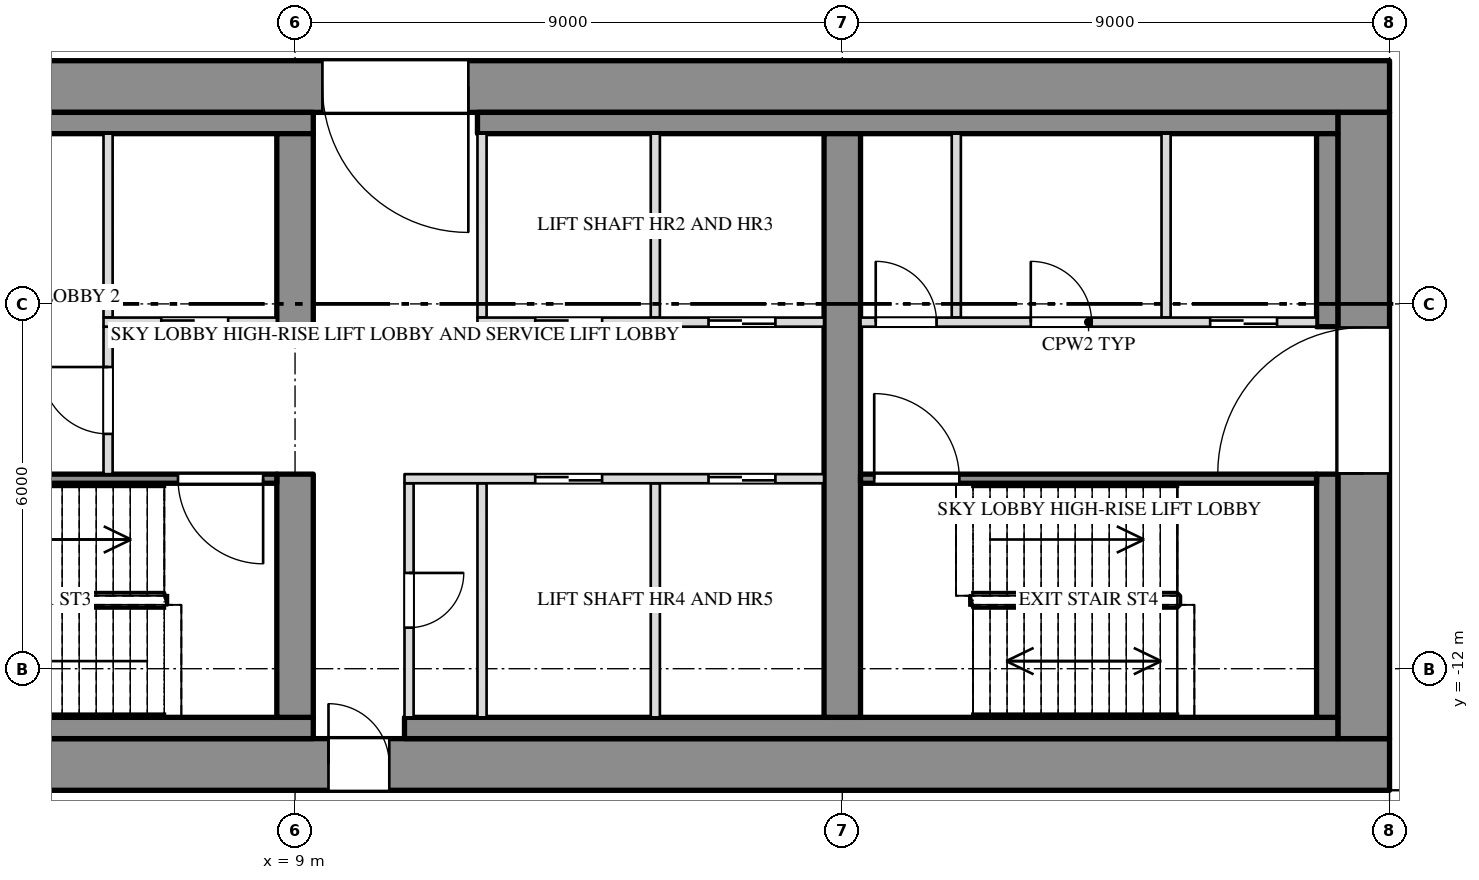
"""IFC4 building model, lengths in metres.
Left out: names, types, materials, properties, quantities, classifications, styles, units other than length and angle.
Written with IfcOpenShell. Run it as: python <this file> out.ifc"""

import sys

from ifc_helpers import new_model, si_unit, direction, frame, frame_2d, origin, place, context, subcontext, project, spatial, rectangle, extrude, element, fill, save


model = new_model("IFC4")
c1 = context("Model", 3, precision=1e-05, world=origin(), true_north=direction((0.0, 1.0)))
c2 = subcontext(c1, "Body", "Model", "MODEL_VIEW")
j1 = project(units=[si_unit("LENGTHUNIT", "METRE"), si_unit("PLANEANGLEUNIT", "RADIAN")], contexts=[c1])
p1 = place(None, origin())
s1 = spatial("IfcSite", under=j1, at=p1, CompositionType="ELEMENT")
p2 = place(p1, origin())
s2 = spatial("IfcBuilding", under=s1, at=p2, CompositionType="ELEMENT")
p3 = place(p2, frame((0.0, 0.0, 212.5)))
s3 = spatial("IfcBuildingStorey", under=s2, at=p3, CompositionType="ELEMENT", Elevation=212.5)
p4 = place(p3, frame((-27.0, -2.425, 0.0), z_axis=(0.0, 0.0, 1.0), x_axis=(1.0, 0.0, 0.0)))
e1 = element("IfcWall", 1, at=p4, inside=s3, PredefinedType="SHEAR", context=c2, shape_type="SweptSolid", body=[
    extrude(rectangle(XDim=54.0, YDim=0.85, at=frame_2d((27.0, 0.0))), origin(), (0.0, 0.0, 1.0), 3.65),
])
p5 = place(p4, frame((15.15, 0.0, 0.0)))
e2 = element("IfcOpeningElement", 2, at=p5, cuts=e1, PredefinedType="OPENING", context=c2, shape_type="SweptSolid", body=[
    extrude(rectangle(XDim=2.4, YDim=2.1, at=frame_2d((1.2, 1.05))), frame((0.0, 0.437, 0.0), z_axis=(0.0, -1.0, 0.0), x_axis=(1.0, 0.0, 0.0)), (0.0, 0.0, 1.0), 0.874),
])
p6 = place(p4, frame((36.45, 0.0, 0.0)))
e3 = element("IfcOpeningElement", 3, at=p6, cuts=e1, PredefinedType="OPENING", context=c2, shape_type="SweptSolid", body=[
    extrude(rectangle(XDim=2.4, YDim=2.1, at=frame_2d((1.2, 1.05))), frame((0.0, 0.437, 0.0), z_axis=(0.0, -1.0, 0.0), x_axis=(1.0, 0.0, 0.0)), (0.0, 0.0, 1.0), 0.874),
])
p7 = place(p3, frame((-27.0, -13.575, 0.0), z_axis=(0.0, 0.0, 1.0), x_axis=(1.0, 0.0, 0.0)))
e4 = element("IfcWall", 4, at=p7, inside=s3, PredefinedType="SHEAR", context=c2, shape_type="SweptSolid", body=[
    extrude(rectangle(XDim=54.0, YDim=0.85, at=frame_2d((27.0, 0.0))), origin(), (0.0, 0.0, 1.0), 3.65),
])
p8 = place(p7, frame((16.45, 0.0, 0.0)))
e5 = element("IfcOpeningElement", 5, at=p8, cuts=e4, PredefinedType="OPENING", context=c2, shape_type="SweptSolid", body=[
    extrude(rectangle(XDim=1.0, YDim=2.1, at=frame_2d((0.5, 1.05))), frame((0.0, 0.437, 0.0), z_axis=(0.0, -1.0, 0.0), x_axis=(1.0, 0.0, 0.0)), (0.0, 0.0, 1.0), 0.874),
])
p9 = place(p7, frame((36.55, 0.0, 0.0)))
e6 = element("IfcOpeningElement", 6, at=p9, cuts=e4, PredefinedType="OPENING", context=c2, shape_type="SweptSolid", body=[
    extrude(rectangle(XDim=1.0, YDim=2.1, at=frame_2d((0.5, 1.05))), frame((0.0, 0.437, 0.0), z_axis=(0.0, -1.0, 0.0), x_axis=(1.0, 0.0, 0.0)), (0.0, 0.0, 1.0), 0.874),
])
p10 = place(p3, frame((26.575, -13.15, 0.0), z_axis=(0.0, 0.0, 1.0), x_axis=(0.0, 1.0, 0.0)))
e7 = element("IfcWall", 7, at=p10, inside=s3, PredefinedType="SHEAR", context=c2, shape_type="SweptSolid", body=[
    extrude(rectangle(XDim=10.3, YDim=0.85, at=frame_2d((5.15, 0.0))), origin(), (0.0, 0.0, 1.0), 3.65),
])
p11 = place(p10, frame((4.362, 0.0, 0.0)))
e8 = element("IfcOpeningElement", 8, at=p11, cuts=e7, PredefinedType="OPENING", context=c2, shape_type="SweptSolid", body=[
    extrude(rectangle(XDim=2.4, YDim=2.1, at=frame_2d((1.2, 1.05))), frame((0.0, 0.437, 0.0), z_axis=(0.0, -1.0, 0.0), x_axis=(1.0, 0.0, 0.0)), (0.0, 0.0, 1.0), 0.874),
])
p12 = place(p3, frame((-9.3, -3.025, 0.0), z_axis=(0.0, 0.0, 1.0), x_axis=(1.0, 0.0, 0.0)))
e9 = element("IfcWall", 9, at=p12, inside=s3, PredefinedType="SHEAR", context=c2, shape_type="SweptSolid", body=[
    extrude(rectangle(XDim=18.6, YDim=0.35, at=frame_2d((9.3, 0.0))), origin(), (0.0, 0.0, 1.0), 3.65),
])
p13 = place(p3, frame((12.0, -3.025, 0.0), z_axis=(0.0, 0.0, 1.0), x_axis=(1.0, 0.0, 0.0)))
e10 = element("IfcWall", 10, at=p13, inside=s3, PredefinedType="SHEAR", context=c2, shape_type="SweptSolid", body=[
    extrude(rectangle(XDim=14.15, YDim=0.35, at=frame_2d((7.075, 0.0))), origin(), (0.0, 0.0, 1.0), 3.65),
])
p14 = place(p3, frame((-9.3, -12.975, 0.0), z_axis=(0.0, 0.0, 1.0), x_axis=(1.0, 0.0, 0.0)))
e11 = element("IfcWall", 11, at=p14, inside=s3, PredefinedType="SHEAR", context=c2, shape_type="SweptSolid", body=[
    extrude(rectangle(XDim=18.6, YDim=0.35, at=frame_2d((9.3, 0.0))), origin(), (0.0, 0.0, 1.0), 3.65),
])
p15 = place(p3, frame((10.8, -12.975, 0.0), z_axis=(0.0, 0.0, 1.0), x_axis=(1.0, 0.0, 0.0)))
e12 = element("IfcWall", 12, at=p15, inside=s3, PredefinedType="SHEAR", context=c2, shape_type="SweptSolid", body=[
    extrude(rectangle(XDim=15.35, YDim=0.35, at=frame_2d((7.675, 0.0))), origin(), (0.0, 0.0, 1.0), 3.65),
])
p16 = place(p3, frame((25.975, -12.8, 0.0), z_axis=(0.0, 0.0, 1.0), x_axis=(0.0, 1.0, 0.0)))
e13 = element("IfcWall", 13, at=p16, inside=s3, PredefinedType="SHEAR", context=c2, shape_type="SweptSolid", body=[
    extrude(rectangle(XDim=4.0, YDim=0.35, at=frame_2d((2.0, 0.0))), origin(), (0.0, 0.0, 1.0), 3.65),
])
p17 = place(p3, frame((25.975, -6.375, 0.0), z_axis=(0.0, 0.0, 1.0), x_axis=(0.0, 1.0, 0.0)))
e14 = element("IfcWall", 14, at=p17, inside=s3, PredefinedType="SHEAR", context=c2, shape_type="SweptSolid", body=[
    extrude(rectangle(XDim=3.175, YDim=0.35, at=frame_2d((1.587, 0.0))), origin(), (0.0, 0.0, 1.0), 3.65),
])
p18 = place(p3, frame((9.0, -12.8, 0.0), z_axis=(0.0, 0.0, 1.0), x_axis=(0.0, 1.0, 0.0)))
e15 = element("IfcWall", 15, at=p18, inside=s3, PredefinedType="SHEAR", context=c2, shape_type="SweptSolid", body=[
    extrude(rectangle(XDim=4.0, YDim=0.6, at=frame_2d((2.0, 0.0))), origin(), (0.0, 0.0, 1.0), 3.65),
])
p19 = place(p3, frame((9.0, -6.375, 0.0), z_axis=(0.0, 0.0, 1.0), x_axis=(0.0, 1.0, 0.0)))
e16 = element("IfcWall", 16, at=p19, inside=s3, PredefinedType="SHEAR", context=c2, shape_type="SweptSolid", body=[
    extrude(rectangle(XDim=3.175, YDim=0.6, at=frame_2d((1.587, 0.0))), origin(), (0.0, 0.0, 1.0), 3.65),
])
p20 = place(p3, frame((18.0, -12.8, 0.0), z_axis=(0.0, 0.0, 1.0), x_axis=(0.0, 1.0, 0.0)))
e17 = element("IfcWall", 17, at=p20, inside=s3, PredefinedType="SHEAR", context=c2, shape_type="SweptSolid", body=[
    extrude(rectangle(XDim=9.6, YDim=0.6, at=frame_2d((4.8, 0.0))), origin(), (0.0, 0.0, 1.0), 3.65),
])
for number, where, z_axis, x_axis in (
    (18, (5.925, -6.225, 0.0), (0.0, 0.0, 1.0), (0.0, 1.0, 0.0)),
    (19, (12.075, -6.225, 0.0), (0.0, 0.0, 1.0), (0.0, 1.0, 0.0)),
    (20, (14.925, -6.225, 0.0), (0.0, 0.0, 1.0), (0.0, 1.0, 0.0)),
    (21, (19.875, -6.225, 0.0), (0.0, 0.0, 1.0), (0.0, 1.0, 0.0)),
    (22, (23.325, -6.225, 0.0), (0.0, 0.0, 1.0), (0.0, 1.0, 0.0)),
):
    element("IfcWall", number, at=place(p3, frame(where, z_axis=z_axis, x_axis=x_axis)), inside=s3, PredefinedType="PARTITIONING", context=c2, shape_type="SweptSolid", body=[
        extrude(rectangle(XDim=3.025, YDim=0.15, at=frame_2d((1.513, 0.0))), origin(), (0.0, 0.0, 1.0), 3.65),
    ])
p21 = place(p3, frame((10.875, -12.8, 0.0), z_axis=(0.0, 0.0, 1.0), x_axis=(0.0, 1.0, 0.0)))
e23 = element("IfcWall", 23, at=p21, inside=s3, PredefinedType="PARTITIONING", context=c2, shape_type="SweptSolid", body=[
    extrude(rectangle(XDim=3.85, YDim=0.15, at=frame_2d((1.925, 0.0))), origin(), (0.0, 0.0, 1.0), 3.65),
])
p22 = place(p21, frame((1.475, 0.0, 0.0)))
e24 = element("IfcOpeningElement", 24, at=p22, cuts=e23, PredefinedType="OPENING", context=c2, shape_type="SweptSolid", body=[
    extrude(rectangle(XDim=0.9, YDim=2.1, at=frame_2d((0.45, 1.05))), frame((0.0, 0.087, 0.0), z_axis=(0.0, -1.0, 0.0), x_axis=(1.0, 0.0, 0.0)), (0.0, 0.0, 1.0), 0.174),
])
for number, where, z_axis, x_axis in (
    (25, (12.075, -12.8, 0.0), (0.0, 0.0, 1.0), (0.0, 1.0, 0.0)),
    (26, (14.925, -12.8, 0.0), (0.0, 0.0, 1.0), (0.0, 1.0, 0.0)),
):
    element("IfcWall", number, at=place(p3, frame(where, z_axis=z_axis, x_axis=x_axis)), inside=s3, PredefinedType="PARTITIONING", context=c2, shape_type="SweptSolid", body=[
        extrude(rectangle(XDim=3.85, YDim=0.15, at=frame_2d((1.925, 0.0))), origin(), (0.0, 0.0, 1.0), 3.65),
    ])
p23 = place(p3, frame((5.925, -8.8, 0.0), z_axis=(0.0, 0.0, 1.0), x_axis=(0.0, 1.0, 0.0)))
e27 = element("IfcWall", 27, at=p23, inside=s3, PredefinedType="PARTITIONING", context=c2, shape_type="SweptSolid", body=[
    extrude(rectangle(XDim=2.425, YDim=0.15, at=frame_2d((1.212, 0.0))), origin(), (0.0, 0.0, 1.0), 3.65),
])
p24 = place(p23, frame((0.662, 0.0, 0.0)))
e28 = element("IfcOpeningElement", 28, at=p24, cuts=e27, PredefinedType="OPENING", context=c2, shape_type="SweptSolid", body=[
    extrude(rectangle(XDim=1.1, YDim=2.1, at=frame_2d((0.55, 1.05))), frame((0.0, 0.087, 0.0), z_axis=(0.0, -1.0, 0.0), x_axis=(1.0, 0.0, 0.0)), (0.0, 0.0, 1.0), 0.174),
])
p25 = place(p3, frame((5.85, -6.3, 0.0), z_axis=(0.0, 0.0, 1.0), x_axis=(1.0, 0.0, 0.0)))
e29 = element("IfcWall", 29, at=p25, inside=s3, PredefinedType="PARTITIONING", context=c2, shape_type="SweptSolid", body=[
    extrude(rectangle(XDim=2.85, YDim=0.15, at=frame_2d((1.425, 0.0))), origin(), (0.0, 0.0, 1.0), 3.65),
])
p26 = place(p25, frame((0.95, 0.0, 0.0)))
e30 = element("IfcOpeningElement", 30, at=p26, cuts=e29, PredefinedType="OPENING", context=c2, shape_type="SweptSolid", body=[
    extrude(rectangle(XDim=1.1, YDim=2.1, at=frame_2d((0.55, 1.05))), frame((0.0, 0.087, 0.0), z_axis=(0.0, -1.0, 0.0), x_axis=(1.0, 0.0, 0.0)), (0.0, 0.0, 1.0), 0.174),
])
p27 = place(p3, frame((12.0, -6.3, 0.0), z_axis=(0.0, 0.0, 1.0), x_axis=(1.0, 0.0, 0.0)))
e31 = element("IfcWall", 31, at=p27, inside=s3, PredefinedType="PARTITIONING", context=c2, shape_type="SweptSolid", body=[
    extrude(rectangle(XDim=5.7, YDim=0.15, at=frame_2d((2.85, 0.0))), origin(), (0.0, 0.0, 1.0), 3.65),
])
p28 = place(p27, frame((0.95, 0.0, 0.0)))
e32 = element("IfcOpeningElement", 32, at=p28, cuts=e31, PredefinedType="OPENING", context=c2, shape_type="SweptSolid", body=[
    extrude(rectangle(XDim=1.1, YDim=2.1, at=frame_2d((0.55, 1.05))), frame((0.0, 0.087, 0.0), z_axis=(0.0, -1.0, 0.0), x_axis=(1.0, 0.0, 0.0)), (0.0, 0.0, 1.0), 0.174),
])
p29 = place(p27, frame((3.8, 0.0, 0.0)))
e33 = element("IfcOpeningElement", 33, at=p29, cuts=e31, PredefinedType="OPENING", context=c2, shape_type="SweptSolid", body=[
    extrude(rectangle(XDim=1.1, YDim=2.1, at=frame_2d((0.55, 1.05))), frame((0.0, 0.087, 0.0), z_axis=(0.0, -1.0, 0.0), x_axis=(1.0, 0.0, 0.0)), (0.0, 0.0, 1.0), 0.174),
])
p30 = place(p3, frame((18.3, -6.3, 0.0), z_axis=(0.0, 0.0, 1.0), x_axis=(1.0, 0.0, 0.0)))
e34 = element("IfcWall", 34, at=p30, inside=s3, PredefinedType="PARTITIONING", context=c2, shape_type="SweptSolid", body=[
    extrude(rectangle(XDim=7.5, YDim=0.15, at=frame_2d((3.75, 0.0))), origin(), (0.0, 0.0, 1.0), 3.65),
])
p31 = place(p30, frame((0.25, 0.0, 0.0)))
e35 = element("IfcOpeningElement", 35, at=p31, cuts=e34, PredefinedType="OPENING", context=c2, shape_type="SweptSolid", body=[
    extrude(rectangle(XDim=1.0, YDim=2.1, at=frame_2d((0.5, 1.05))), frame((0.0, 0.087, 0.0), z_axis=(0.0, -1.0, 0.0), x_axis=(1.0, 0.0, 0.0)), (0.0, 0.0, 1.0), 0.174),
])
p32 = place(p30, frame((2.8, 0.0, 0.0)))
e36 = element("IfcOpeningElement", 36, at=p32, cuts=e34, PredefinedType="OPENING", context=c2, shape_type="SweptSolid", body=[
    extrude(rectangle(XDim=1.0, YDim=2.1, at=frame_2d((0.5, 1.05))), frame((0.0, 0.087, 0.0), z_axis=(0.0, -1.0, 0.0), x_axis=(1.0, 0.0, 0.0)), (0.0, 0.0, 1.0), 0.174),
])
p33 = place(p30, frame((5.75, 0.0, 0.0)))
e37 = element("IfcOpeningElement", 37, at=p33, cuts=e34, PredefinedType="OPENING", context=c2, shape_type="SweptSolid", body=[
    extrude(rectangle(XDim=1.1, YDim=2.1, at=frame_2d((0.55, 1.05))), frame((0.0, 0.087, 0.0), z_axis=(0.0, -1.0, 0.0), x_axis=(1.0, 0.0, 0.0)), (0.0, 0.0, 1.0), 0.174),
])
p34 = place(p3, frame((0.3, -8.875, 0.0), z_axis=(0.0, 0.0, 1.0), x_axis=(1.0, 0.0, 0.0)))
e38 = element("IfcWall", 38, at=p34, inside=s3, PredefinedType="SHEAR", context=c2, shape_type="SweptSolid", body=[
    extrude(rectangle(XDim=8.4, YDim=0.15, at=frame_2d((4.2, 0.0))), origin(), (0.0, 0.0, 1.0), 3.65),
])
p35 = place(p34, frame((6.775, 0.0, 0.0)))
e39 = element("IfcOpeningElement", 39, at=p35, cuts=e38, PredefinedType="OPENING", context=c2, shape_type="SweptSolid", body=[
    extrude(rectangle(XDim=1.4, YDim=2.1, at=frame_2d((0.7, 1.05))), frame((0.0, 0.087, 0.0), z_axis=(0.0, -1.0, 0.0), x_axis=(1.0, 0.0, 0.0)), (0.0, 0.0, 1.0), 0.174),
])
p36 = place(p3, frame((10.8, -8.875, 0.0), z_axis=(0.0, 0.0, 1.0), x_axis=(1.0, 0.0, 0.0)))
e40 = element("IfcWall", 40, at=p36, inside=s3, PredefinedType="PARTITIONING", context=c2, shape_type="SweptSolid", body=[
    extrude(rectangle(XDim=6.9, YDim=0.15, at=frame_2d((3.45, 0.0))), origin(), (0.0, 0.0, 1.0), 3.65),
])
p37 = place(p36, frame((2.15, 0.0, 0.0)))
e41 = element("IfcOpeningElement", 41, at=p37, cuts=e40, PredefinedType="OPENING", context=c2, shape_type="SweptSolid", body=[
    extrude(rectangle(XDim=1.1, YDim=2.1, at=frame_2d((0.55, 1.05))), frame((0.0, 0.087, 0.0), z_axis=(0.0, -1.0, 0.0), x_axis=(1.0, 0.0, 0.0)), (0.0, 0.0, 1.0), 0.174),
])
p38 = place(p36, frame((5.0, 0.0, 0.0)))
e42 = element("IfcOpeningElement", 42, at=p38, cuts=e40, PredefinedType="OPENING", context=c2, shape_type="SweptSolid", body=[
    extrude(rectangle(XDim=1.1, YDim=2.1, at=frame_2d((0.55, 1.05))), frame((0.0, 0.087, 0.0), z_axis=(0.0, -1.0, 0.0), x_axis=(1.0, 0.0, 0.0)), (0.0, 0.0, 1.0), 0.174),
])
p39 = place(p3, frame((18.3, -8.875, 0.0), z_axis=(0.0, 0.0, 1.0), x_axis=(1.0, 0.0, 0.0)))
e43 = element("IfcWall", 43, at=p39, inside=s3, PredefinedType="SHEAR", context=c2, shape_type="SweptSolid", body=[
    extrude(rectangle(XDim=7.5, YDim=0.15, at=frame_2d((3.75, 0.0))), origin(), (0.0, 0.0, 1.0), 3.65),
])
p40 = place(p39, frame((0.225, 0.0, 0.0)))
e44 = element("IfcOpeningElement", 44, at=p40, cuts=e43, PredefinedType="OPENING", context=c2, shape_type="SweptSolid", body=[
    extrude(rectangle(XDim=1.4, YDim=2.1, at=frame_2d((0.7, 1.05))), frame((0.0, 0.087, 0.0), z_axis=(0.0, -1.0, 0.0), x_axis=(1.0, 0.0, 0.0)), (0.0, 0.0, 1.0), 0.174),
])
p41 = place(p24, origin())
e45 = element("IfcDoor", 45, at=p41, inside=s3, OperationType="SINGLE_SWING_RIGHT", PredefinedType="DOOR", context=c2, shape_type="SweptSolid", body=[
    extrude(rectangle(XDim=1.1, YDim=2.1, at=frame_2d((0.55, 1.05))), frame((0.0, 0.025, 0.0), z_axis=(0.0, -1.0, 0.0), x_axis=(1.0, 0.0, 0.0)), (0.0, 0.0, 1.0), 0.05),
])
fill(e28, e45)
p42 = place(p26, origin())
e46 = element("IfcDoor", 46, at=p42, inside=s3, OperationType="SLIDING_TO_LEFT", PredefinedType="DOOR", context=c2, shape_type="SweptSolid", body=[
    extrude(rectangle(XDim=1.1, YDim=2.1, at=frame_2d((0.55, 1.05))), frame((0.0, 0.025, 0.0), z_axis=(0.0, -1.0, 0.0), x_axis=(1.0, 0.0, 0.0)), (0.0, 0.0, 1.0), 0.05),
])
fill(e30, e46)
p43 = place(p35, origin())
e47 = element("IfcDoor", 47, at=p43, inside=s3, OperationType="DOUBLE_DOOR_SINGLE_SWING", PredefinedType="DOOR", context=c2, shape_type="SweptSolid", body=[
    extrude(rectangle(XDim=1.4, YDim=2.1, at=frame_2d((0.7, 1.05))), frame((0.0, 0.025, 0.0), z_axis=(0.0, -1.0, 0.0), x_axis=(1.0, 0.0, 0.0)), (0.0, 0.0, 1.0), 0.05),
])
fill(e39, e47)
p44 = place(p9, origin())
e48 = element("IfcDoor", 48, at=p44, inside=s3, OperationType="SINGLE_SWING_LEFT", PredefinedType="DOOR", context=c2, shape_type="SweptSolid", body=[
    extrude(rectangle(XDim=1.0, YDim=2.1, at=frame_2d((0.5, 1.05))), frame((0.0, 0.025, 0.0), z_axis=(0.0, -1.0, 0.0), x_axis=(1.0, 0.0, 0.0)), (0.0, 0.0, 1.0), 0.05),
])
fill(e6, e48)
p45 = place(p6, origin())
e49 = element("IfcDoor", 49, at=p45, inside=s3, OperationType="DOUBLE_DOOR_SINGLE_SWING", PredefinedType="DOOR", context=c2, shape_type="SweptSolid", body=[
    extrude(rectangle(XDim=2.4, YDim=2.1, at=frame_2d((1.2, 1.05))), frame((0.0, 0.025, 0.0), z_axis=(0.0, -1.0, 0.0), x_axis=(1.0, 0.0, 0.0)), (0.0, 0.0, 1.0), 0.05),
])
fill(e3, e49)
p46 = place(p22, origin())
e50 = element("IfcDoor", 50, at=p46, inside=s3, OperationType="SINGLE_SWING_LEFT", PredefinedType="DOOR", context=c2, shape_type="SweptSolid", body=[
    extrude(rectangle(XDim=0.9, YDim=2.1, at=frame_2d((0.45, 1.05))), frame((0.0, 0.025, 0.0), z_axis=(0.0, -1.0, 0.0), x_axis=(1.0, 0.0, 0.0)), (0.0, 0.0, 1.0), 0.05),
])
fill(e24, e50)
p47 = place(p37, origin())
e51 = element("IfcDoor", 51, at=p47, inside=s3, OperationType="SLIDING_TO_RIGHT", PredefinedType="DOOR", context=c2, shape_type="SweptSolid", body=[
    extrude(rectangle(XDim=1.1, YDim=2.1, at=frame_2d((0.55, 1.05))), frame((0.0, 0.025, 0.0), z_axis=(0.0, -1.0, 0.0), x_axis=(1.0, 0.0, 0.0)), (0.0, 0.0, 1.0), 0.05),
])
fill(e41, e51)
p48 = place(p28, origin())
e52 = element("IfcDoor", 52, at=p48, inside=s3, OperationType="SLIDING_TO_LEFT", PredefinedType="DOOR", context=c2, shape_type="SweptSolid", body=[
    extrude(rectangle(XDim=1.1, YDim=2.1, at=frame_2d((0.55, 1.05))), frame((0.0, 0.025, 0.0), z_axis=(0.0, -1.0, 0.0), x_axis=(1.0, 0.0, 0.0)), (0.0, 0.0, 1.0), 0.05),
])
fill(e32, e52)
p49 = place(p38, origin())
e53 = element("IfcDoor", 53, at=p49, inside=s3, OperationType="SLIDING_TO_RIGHT", PredefinedType="DOOR", context=c2, shape_type="SweptSolid", body=[
    extrude(rectangle(XDim=1.1, YDim=2.1, at=frame_2d((0.55, 1.05))), frame((0.0, 0.025, 0.0), z_axis=(0.0, -1.0, 0.0), x_axis=(1.0, 0.0, 0.0)), (0.0, 0.0, 1.0), 0.05),
])
fill(e42, e53)
p50 = place(p29, origin())
e54 = element("IfcDoor", 54, at=p50, inside=s3, OperationType="SLIDING_TO_LEFT", PredefinedType="DOOR", context=c2, shape_type="SweptSolid", body=[
    extrude(rectangle(XDim=1.1, YDim=2.1, at=frame_2d((0.55, 1.05))), frame((0.0, 0.025, 0.0), z_axis=(0.0, -1.0, 0.0), x_axis=(1.0, 0.0, 0.0)), (0.0, 0.0, 1.0), 0.05),
])
fill(e33, e54)
p51 = place(p31, origin())
e55 = element("IfcDoor", 55, at=p51, inside=s3, OperationType="SINGLE_SWING_LEFT", PredefinedType="DOOR", context=c2, shape_type="SweptSolid", body=[
    extrude(rectangle(XDim=1.0, YDim=2.1, at=frame_2d((0.5, 1.05))), frame((0.0, 0.025, 0.0), z_axis=(0.0, -1.0, 0.0), x_axis=(1.0, 0.0, 0.0)), (0.0, 0.0, 1.0), 0.05),
])
fill(e35, e55)
p52 = place(p40, origin())
e56 = element("IfcDoor", 56, at=p52, inside=s3, OperationType="DOUBLE_DOOR_SINGLE_SWING", PredefinedType="DOOR", context=c2, shape_type="SweptSolid", body=[
    extrude(rectangle(XDim=1.4, YDim=2.1, at=frame_2d((0.7, 1.05))), frame((0.0, 0.025, 0.0), z_axis=(0.0, -1.0, 0.0), x_axis=(1.0, 0.0, 0.0)), (0.0, 0.0, 1.0), 0.05),
])
fill(e44, e56)
p53 = place(p32, origin())
e57 = element("IfcDoor", 57, at=p53, inside=s3, OperationType="SINGLE_SWING_LEFT", PredefinedType="DOOR", context=c2, shape_type="SweptSolid", body=[
    extrude(rectangle(XDim=1.0, YDim=2.1, at=frame_2d((0.5, 1.05))), frame((0.0, 0.025, 0.0), z_axis=(0.0, -1.0, 0.0), x_axis=(1.0, 0.0, 0.0)), (0.0, 0.0, 1.0), 0.05),
])
fill(e36, e57)
p54 = place(p33, origin())
e58 = element("IfcDoor", 58, at=p54, inside=s3, OperationType="SLIDING_TO_LEFT", PredefinedType="DOOR", context=c2, shape_type="SweptSolid", body=[
    extrude(rectangle(XDim=1.1, YDim=2.1, at=frame_2d((0.55, 1.05))), frame((0.0, 0.025, 0.0), z_axis=(0.0, -1.0, 0.0), x_axis=(1.0, 0.0, 0.0)), (0.0, 0.0, 1.0), 0.05),
])
fill(e37, e58)
p55 = place(p11, origin())
e59 = element("IfcDoor", 59, at=p55, inside=s3, OperationType="DOUBLE_DOOR_SINGLE_SWING", PredefinedType="DOOR", context=c2, shape_type="SweptSolid", body=[
    extrude(rectangle(XDim=2.4, YDim=2.1, at=frame_2d((1.2, 1.05))), frame((0.0, 0.025, 0.0), z_axis=(0.0, -1.0, 0.0), x_axis=(1.0, 0.0, 0.0)), (0.0, 0.0, 1.0), 0.05),
])
fill(e8, e59)
save(model, sys.argv[1])
